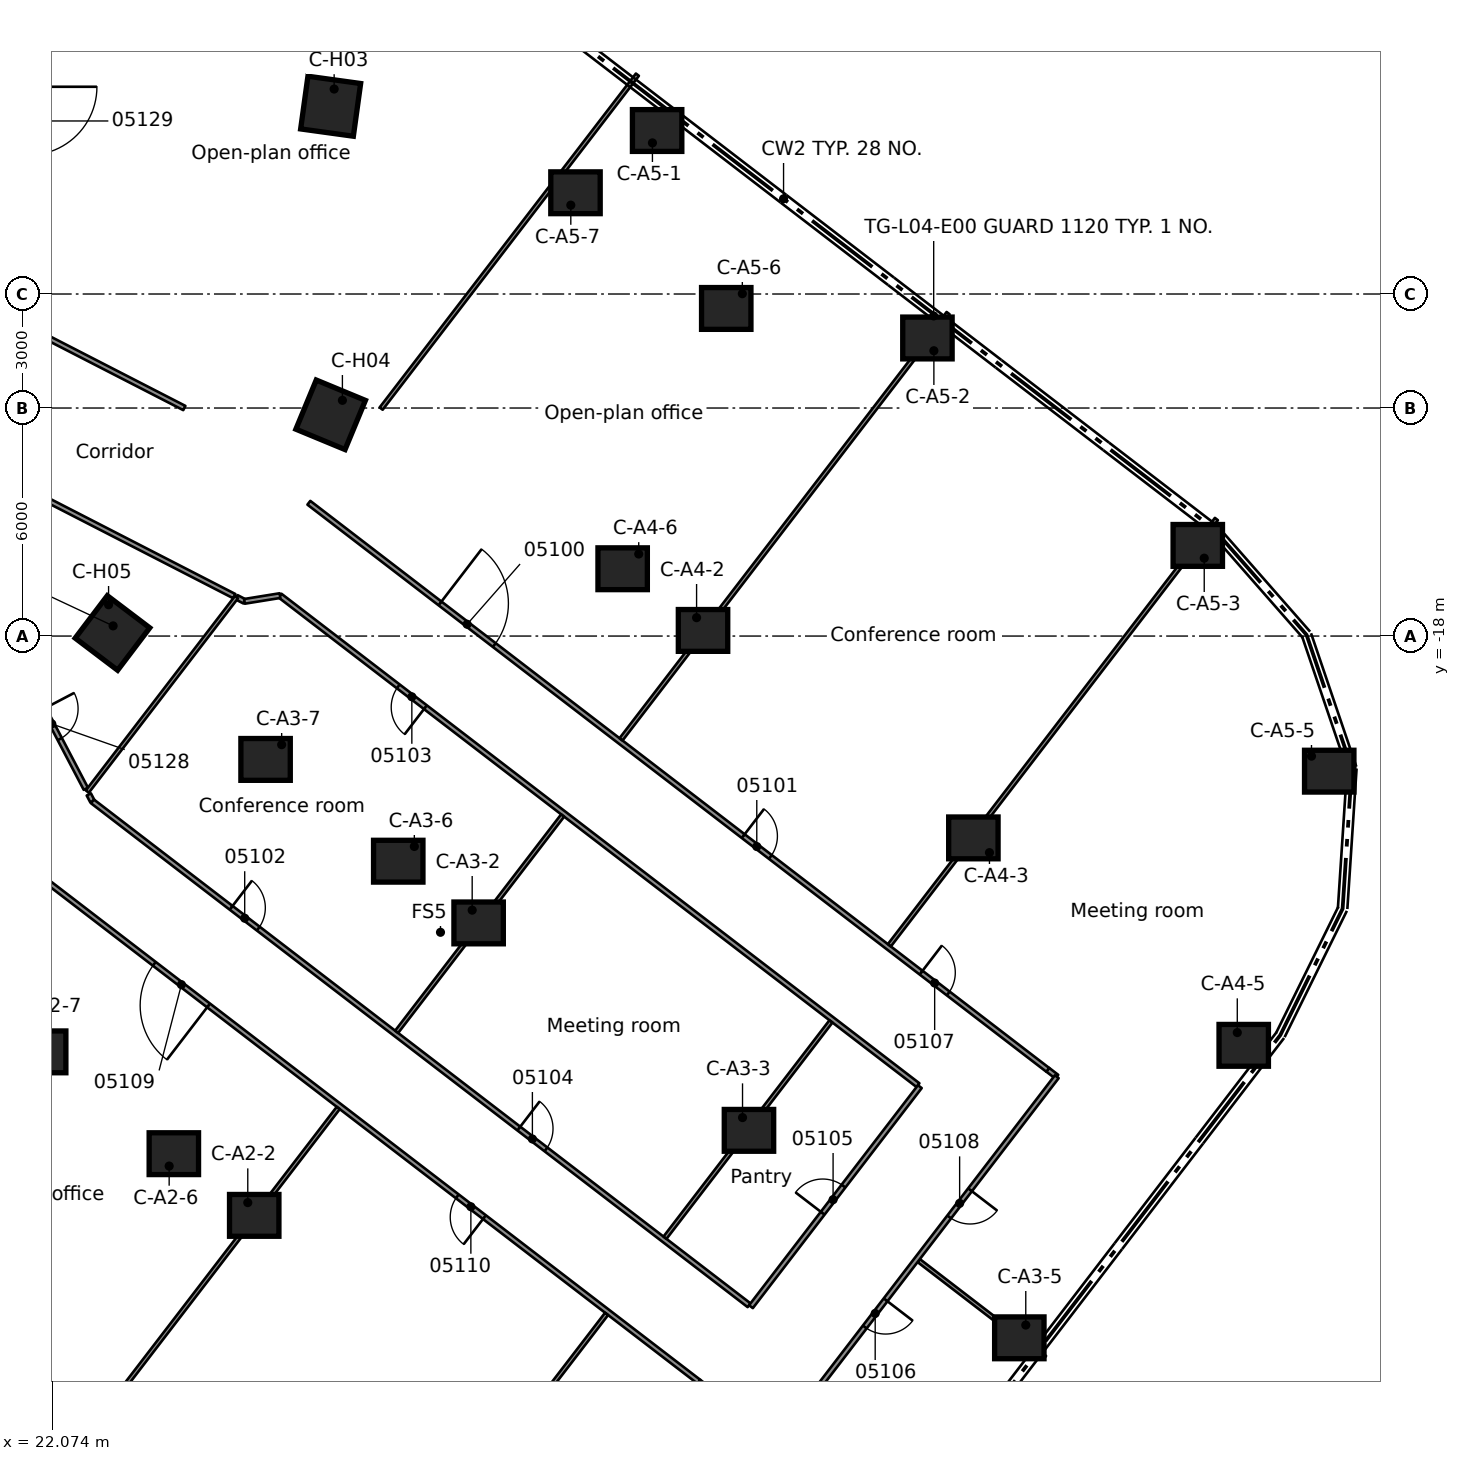
"""IFC4 building model, lengths in metres.
Left out: names, types, materials, properties, quantities, classifications, styles, units other than length and angle.
Written with IfcOpenShell. Run it as: python <this file> out.ifc"""

import sys

from ifc_helpers import new_model, si_unit, direction, frame, frame_2d, origin, origin_2d, place, context, subcontext, project, spatial, rectangle, extrude, element, fill, save


model = new_model("IFC4")
c1 = context("Model", 3, precision=1e-05, world=origin(), true_north=direction((0.0, 1.0)))
c2 = subcontext(c1, "Body", "Model", "MODEL_VIEW")
j1 = project(units=[si_unit("LENGTHUNIT", "METRE"), si_unit("PLANEANGLEUNIT", "RADIAN")], contexts=[c1])
p1 = place(None, origin())
s1 = spatial("IfcSite", under=j1, at=p1, CompositionType="ELEMENT")
p2 = place(p1, origin())
s2 = spatial("IfcBuilding", under=s1, at=p2, CompositionType="ELEMENT")
p3 = place(p2, frame((0.0, 0.0, 25.1)))
s3 = spatial("IfcBuildingStorey", under=s2, at=p3, CompositionType="ELEMENT", Elevation=25.1)
for number, where, z_axis, x_axis in (
    (1, (27.389, -33.243, 0.0), (0.0, 0.0, 1.0), (1.0, 0.0, 0.0)),
    (2, (25.274, -31.62, 0.0), (0.0, 0.0, 1.0), (1.0, 0.0, 0.0)),
    (3, (21.783, -28.941, 0.0), (0.0, 0.0, 1.0), (1.0, 0.0, 0.0)),
    (4, (33.294, -25.548, 0.0), (0.0, 0.0, 1.0), (1.0, 0.0, 0.0)),
    (5, (40.408, -31.006, 0.0), (0.0, 0.0, 1.0), (1.0, 0.0, 0.0)),
    (6, (47.522, -36.465, 0.0), (0.0, 0.0, 1.0), (1.0, 0.0, 0.0)),
    (7, (31.179, -23.924, 0.0), (0.0, 0.0, 1.0), (1.0, 0.0, 0.0)),
    (8, (27.688, -21.246, 0.0), (0.0, 0.0, 1.0), (1.0, 0.0, 0.0)),
    (9, (39.199, -17.852, 0.0), (0.0, 0.0, 1.0), (1.0, 0.0, 0.0)),
    (10, (46.313, -23.311, 0.0), (0.0, 0.0, 1.0), (1.0, 0.0, 0.0)),
    (11, (53.427, -28.769, 0.0), (0.0, 0.0, 1.0), (1.0, 0.0, 0.0)),
    (12, (37.084, -16.229, 0.0), (0.0, 0.0, 1.0), (1.0, 0.0, 0.0)),
    (13, (37.991, -4.698, 0.0), (0.0, 0.0, 1.0), (1.0, 0.0, 0.0)),
    (14, (45.104, -10.157, 0.0), (0.0, 0.0, 1.0), (1.0, 0.0, 0.0)),
    (15, (52.218, -15.615, 0.0), (0.0, 0.0, 1.0), (1.0, 0.0, 0.0)),
    (16, (55.677, -21.555, 0.0), (0.0, 0.0, 1.0), (1.0, 0.0, 0.0)),
    (17, (39.81, -9.38, 0.0), (0.0, 0.0, 1.0), (1.0, 0.0, 0.0)),
    (18, (35.843, -6.336, 0.0), (0.0, 0.0, 1.0), (1.0, 0.0, 0.0)),
):
    element("IfcColumn", number, at=place(p3, frame(where, z_axis=z_axis, x_axis=x_axis)), inside=s3, PredefinedType="COLUMN", context=c2, shape_type="SweptSolid", body=[
        extrude(rectangle(XDim=1.3, YDim=1.1, at=origin_2d()), origin(), (0.0, 0.0, 1.0), 4.1),
    ])
for number, where, z_axis, x_axis in (
    (19, (29.4, -4.059, 0.0), (0.0, 0.0, 1.0), (0.991, -0.137, 0.0)),
    (20, (29.4, -12.178, 0.0), (0.0, 0.0, 1.0), (0.924, -0.383, 0.0)),
    (21, (23.659, -17.919, 0.0), (0.0, 0.0, 1.0), (0.797, -0.604, 0.0)),
):
    element("IfcColumn", number, at=place(p3, frame(where, z_axis=z_axis, x_axis=x_axis)), inside=s3, PredefinedType="COLUMN", context=c2, shape_type="SweptSolid", body=[
        extrude(rectangle(XDim=1.4, YDim=1.4, at=origin_2d()), origin(), (0.0, 0.0, 1.0), 4.1),
    ])
p4 = place(p3, frame((23.036, -22.167, 0.0), z_axis=(0.0, 0.0, 1.0), x_axis=(0.465065214543, -0.885276423623, 0.0)))
e22 = element("IfcWall", 22, at=p4, inside=s3, PredefinedType="PARTITIONING", context=c2, shape_type="SweptSolid", body=[
    extrude(rectangle(XDim=0.207, YDim=0.125, at=frame_2d((0.104, 0.0))), origin(), (0.0, 0.0, 1.0), 3.68),
])
p5 = place(p3, frame((21.14, -18.552, 0.0), z_axis=(0.0, 0.0, 1.0), x_axis=(0.464519693812, -0.885562789451, 0.0)))
e23 = element("IfcWall", 23, at=p5, inside=s3, PredefinedType="PARTITIONING", context=c2, shape_type="SweptSolid", body=[
    extrude(rectangle(XDim=3.914, YDim=0.125, at=frame_2d((1.957, 0.0))), origin(), (0.0, 0.0, 1.0), 3.68),
])
p6 = place(p5, frame((1.538, 0.0, 0.0)))
e24 = element("IfcOpeningElement", 24, at=p6, cuts=e23, PredefinedType="OPENING", context=c2, shape_type="SweptSolid", body=[
    extrude(rectangle(XDim=0.9, YDim=2.1, at=frame_2d((0.45, 1.05))), frame((0.0, 0.073, 0.0), z_axis=(0.0, -1.0, 0.0), x_axis=(1.0, 0.0, 0.0)), (0.0, 0.0, 1.0), 0.145),
])
p7 = place(p3, frame((48.27, -29.412, 0.0), z_axis=(0.0, 0.0, 1.0), x_axis=(0.793016893484, -0.609199644328, 0.0)))
e25 = element("IfcWall", 25, at=p7, inside=s3, PredefinedType="PARTITIONING", context=c2, shape_type="SweptSolid", body=[
    extrude(rectangle(XDim=0.3, YDim=0.125, at=frame_2d((0.15, 0.0))), origin(), (0.0, 0.0, 1.0), 3.68),
])
p8 = place(p3, frame((39.09, -37.62, 0.0), z_axis=(0.0, 0.0, 1.0), x_axis=(-0.793364364442, 0.608747061786, 0.0)))
e26 = element("IfcWall", 26, at=p8, inside=s3, PredefinedType="PARTITIONING", context=c2, shape_type="SweptSolid", body=[
    extrude(rectangle(XDim=22.17, YDim=0.125, at=frame_2d((11.085, 0.0))), origin(), (0.0, 0.0, 1.0), 3.68),
])
p9 = place(p8, frame((16.263, 0.0, 0.0)))
e27 = element("IfcOpeningElement", 27, at=p9, cuts=e26, PredefinedType="OPENING", context=c2, shape_type="SweptSolid", body=[
    extrude(rectangle(XDim=1.8, YDim=2.1, at=frame_2d((0.9, 1.05))), frame((0.0, 0.073, 0.0), z_axis=(0.0, -1.0, 0.0), x_axis=(1.0, 0.0, 0.0)), (0.0, 0.0, 1.0), 0.145),
])
p10 = place(p8, frame((7.113, 0.0, 0.0)))
e28 = element("IfcOpeningElement", 28, at=p10, cuts=e26, PredefinedType="OPENING", context=c2, shape_type="SweptSolid", body=[
    extrude(rectangle(XDim=0.9, YDim=2.1, at=frame_2d((0.45, 1.05))), frame((0.0, 0.073, 0.0), z_axis=(0.0, -1.0, 0.0), x_axis=(1.0, 0.0, 0.0)), (0.0, 0.0, 1.0), 0.145),
])
p11 = place(p3, frame((39.089, -37.62, 0.0), z_axis=(0.0, 0.0, 1.0), x_axis=(0.793216962218, -0.608939119166, 0.0)))
e29 = element("IfcWall", 29, at=p11, inside=s3, PredefinedType="PARTITIONING", context=c2, shape_type="SweptSolid", body=[
    extrude(rectangle(XDim=2.524, YDim=0.125, at=frame_2d((1.262, 0.0))), origin(), (0.0, 0.0, 1.0), 3.68),
])
p12 = place(p3, frame((23.132, -22.35, 0.0), z_axis=(0.0, 0.0, 1.0), x_axis=(0.79336850047, -0.60874167137, 0.0)))
e30 = element("IfcWall", 30, at=p12, inside=s3, PredefinedType="PARTITIONING", context=c2, shape_type="SweptSolid", body=[
    extrude(rectangle(XDim=21.779, YDim=0.125, at=frame_2d((10.89, 0.0))), origin(), (0.0, 0.0, 1.0), 3.68),
])
p13 = place(p12, frame((4.6, 0.0, 0.0)))
e31 = element("IfcOpeningElement", 31, at=p13, cuts=e30, PredefinedType="OPENING", context=c2, shape_type="SweptSolid", body=[
    extrude(rectangle(XDim=0.9, YDim=2.1, at=frame_2d((0.45, 1.05))), frame((0.0, 0.073, 0.0), z_axis=(0.0, -1.0, 0.0), x_axis=(1.0, 0.0, 0.0)), (0.0, 0.0, 1.0), 0.145),
])
p14 = place(p12, frame((14.142, 0.0, 0.0)))
e32 = element("IfcOpeningElement", 32, at=p14, cuts=e30, PredefinedType="OPENING", context=c2, shape_type="SweptSolid", body=[
    extrude(rectangle(XDim=0.9, YDim=2.1, at=frame_2d((0.45, 1.05))), frame((0.0, 0.073, 0.0), z_axis=(0.0, -1.0, 0.0), x_axis=(1.0, 0.0, 0.0)), (0.0, 0.0, 1.0), 0.145),
])
p15 = place(p3, frame((44.875, -34.433, 0.0), z_axis=(0.0, 0.0, 1.0), x_axis=(0.793295570217, -0.60883670904, 0.0)))
e33 = element("IfcWall", 33, at=p15, inside=s3, PredefinedType="PARTITIONING", context=c2, shape_type="SweptSolid", body=[
    extrude(rectangle(XDim=4.186, YDim=0.1, at=frame_2d((2.093, 0.0))), origin(), (0.0, 0.0, 1.0), 3.68),
])
p16 = place(p3, frame((44.855, -29.817, 0.0), z_axis=(0.0, 0.0, 1.0), x_axis=(-0.793378264443, 0.608728945844, 0.0)))
e34 = element("IfcWall", 34, at=p16, inside=s3, PredefinedType="PARTITIONING", context=c2, shape_type="SweptSolid", body=[
    extrude(rectangle(XDim=21.16, YDim=0.125, at=frame_2d((10.58, 0.0))), origin(), (0.0, 0.0, 1.0), 3.68),
])
p17 = place(p16, frame((16.337, 0.0, 0.0)))
e35 = element("IfcOpeningElement", 35, at=p17, cuts=e34, PredefinedType="OPENING", context=c2, shape_type="SweptSolid", body=[
    extrude(rectangle(XDim=0.9, YDim=2.1, at=frame_2d((0.45, 1.05))), frame((0.0, 0.073, 0.0), z_axis=(0.0, -1.0, 0.0), x_axis=(1.0, 0.0, 0.0)), (0.0, 0.0, 1.0), 0.145),
])
p18 = place(p3, frame((28.827, -14.493, 0.0), z_axis=(0.0, 0.0, 1.0), x_axis=(0.793315591759, -0.608810620695, 0.0)))
e36 = element("IfcWall", 36, at=p18, inside=s3, PredefinedType="PARTITIONING", context=c2, shape_type="SweptSolid", body=[
    extrude(rectangle(XDim=24.509, YDim=0.125, at=frame_2d((12.254, 0.0))), origin(), (0.0, 0.0, 1.0), 3.68),
])
p19 = place(p18, frame((4.35, 0.0, 0.0)))
e37 = element("IfcOpeningElement", 37, at=p19, cuts=e36, PredefinedType="OPENING", context=c2, shape_type="SweptSolid", body=[
    extrude(rectangle(XDim=1.8, YDim=2.1, at=frame_2d((0.9, 1.05))), frame((0.0, 0.073, 0.0), z_axis=(0.0, -1.0, 0.0), x_axis=(1.0, 0.0, 0.0)), (0.0, 0.0, 1.0), 0.145),
])
p20 = place(p18, frame((14.407, 0.0, 0.0)))
e38 = element("IfcOpeningElement", 38, at=p20, cuts=e36, PredefinedType="OPENING", context=c2, shape_type="SweptSolid", body=[
    extrude(rectangle(XDim=0.9, YDim=2.1, at=frame_2d((0.45, 1.05))), frame((0.0, 0.073, 0.0), z_axis=(0.0, -1.0, 0.0), x_axis=(1.0, 0.0, 0.0)), (0.0, 0.0, 1.0), 0.145),
])
p21 = place(p18, frame((20.307, 0.0, 0.0)))
e39 = element("IfcOpeningElement", 39, at=p21, cuts=e36, PredefinedType="OPENING", context=c2, shape_type="SweptSolid", body=[
    extrude(rectangle(XDim=0.9, YDim=2.1, at=frame_2d((0.45, 1.05))), frame((0.0, 0.073, 0.0), z_axis=(0.0, -1.0, 0.0), x_axis=(1.0, 0.0, 0.0)), (0.0, 0.0, 1.0), 0.145),
])
p22 = place(p3, frame((26.921, -16.978, 0.0), z_axis=(0.0, 0.0, 1.0), x_axis=(0.888809707019, -0.458276450093, 0.0)))
e40 = element("IfcWall", 40, at=p22, inside=s3, PredefinedType="PARTITIONING", context=c2, shape_type="SweptSolid", body=[
    extrude(rectangle(XDim=0.238, YDim=0.125, at=frame_2d((0.119, 0.0))), origin(), (0.0, 0.0, 1.0), 3.68),
])
p23 = place(p3, frame((21.541, -14.214, 0.0), z_axis=(0.0, 0.0, 1.0), x_axis=(0.889437525622, -0.457056766732, 0.0)))
e41 = element("IfcWall", 41, at=p23, inside=s3, PredefinedType="PARTITIONING", context=c2, shape_type="SweptSolid", body=[
    extrude(rectangle(XDim=5.986, YDim=0.125, at=frame_2d((2.993, 0.0))), origin(), (0.0, 0.0, 1.0), 3.68),
])
p24 = place(p3, frame((21.541, -9.94, 0.0), z_axis=(0.0, 0.0, 1.0), x_axis=(0.889443846495, -0.457044466033, 0.0)))
e42 = element("IfcWall", 42, at=p24, inside=s3, PredefinedType="PARTITIONING", context=c2, shape_type="SweptSolid", body=[
    extrude(rectangle(XDim=4.507, YDim=0.125, at=frame_2d((2.254, 0.0))), origin(), (0.0, 0.0, 1.0), 3.68),
])
p25 = place(p3, frame((48.508, -29.595, 0.0), z_axis=(0.0, 0.0, 1.0), x_axis=(-0.608738166201, -0.793371189929, 0.0)))
e43 = element("IfcWall", 43, at=p25, inside=s3, PredefinedType="PARTITIONING", context=c2, shape_type="SweptSolid", body=[
    extrude(rectangle(XDim=12.1, YDim=0.125, at=frame_2d((6.05, 0.0))), origin(), (0.0, 0.0, 1.0), 3.68),
])
p26 = place(p25, frame((7.4, 0.0, 0.0)))
e44 = element("IfcOpeningElement", 44, at=p26, cuts=e43, PredefinedType="OPENING", context=c2, shape_type="SweptSolid", body=[
    extrude(rectangle(XDim=0.9, YDim=2.1, at=frame_2d((0.45, 1.05))), frame((0.0, 0.073, 0.0), z_axis=(0.0, -1.0, 0.0), x_axis=(1.0, 0.0, 0.0)), (0.0, 0.0, 1.0), 0.145),
])
p27 = place(p25, frame((3.75, 0.0, 0.0)))
e45 = element("IfcOpeningElement", 45, at=p27, cuts=e43, PredefinedType="OPENING", context=c2, shape_type="SweptSolid", body=[
    extrude(rectangle(XDim=0.9, YDim=2.1, at=frame_2d((0.45, 1.05))), frame((0.0, 0.073, 0.0), z_axis=(0.0, -1.0, 0.0), x_axis=(1.0, 0.0, 0.0)), (0.0, 0.0, 1.0), 0.145),
])
p28 = place(p3, frame((40.46, -35.646, 0.0), z_axis=(0.0, 0.0, 1.0), x_axis=(0.608868228501, 0.793271378736, 0.0)))
e46 = element("IfcWall", 46, at=p28, inside=s3, PredefinedType="PARTITIONING", context=c2, shape_type="SweptSolid", body=[
    extrude(rectangle(XDim=7.299, YDim=0.125, at=frame_2d((3.649, 0.0))), origin(), (0.0, 0.0, 1.0), 3.68),
])
p29 = place(p28, frame((3.1, 0.0, 0.0)))
e47 = element("IfcOpeningElement", 47, at=p29, cuts=e46, PredefinedType="OPENING", context=c2, shape_type="SweptSolid", body=[
    extrude(rectangle(XDim=0.9, YDim=2.1, at=frame_2d((0.45, 1.05))), frame((0.0, 0.073, 0.0), z_axis=(0.0, -1.0, 0.0), x_axis=(1.0, 0.0, 0.0)), (0.0, 0.0, 1.0), 0.145),
])
p30 = place(p3, frame((28.054, -47.051, 0.0), z_axis=(0.0, 0.0, 1.0), x_axis=(0.608819037892, 0.793309132117, 0.0)))
e48 = element("IfcWall", 48, at=p30, inside=s3, PredefinedType="PARTITIONING", context=c2, shape_type="SweptSolid", body=[
    extrude(rectangle(XDim=14.137, YDim=0.1, at=frame_2d((7.069, 0.0))), origin(), (0.0, 0.0, 1.0), 3.68),
])
p31 = place(p3, frame((38.198, -33.831, 0.0), z_axis=(0.0, 0.0, 1.0), x_axis=(0.60875801413, 0.793355960608, 0.0)))
e49 = element("IfcWall", 49, at=p31, inside=s3, PredefinedType="PARTITIONING", context=c2, shape_type="SweptSolid", body=[
    extrude(rectangle(XDim=7.174, YDim=0.1, at=frame_2d((3.587, 0.0))), origin(), (0.0, 0.0, 1.0), 3.68),
])
p32 = place(p3, frame((44.103, -26.136, 0.0), z_axis=(0.0, 0.0, 1.0), x_axis=(0.608732079898, 0.793375859793, 0.0)))
e50 = element("IfcWall", 50, at=p32, inside=s3, PredefinedType="PARTITIONING", context=c2, shape_type="SweptSolid", body=[
    extrude(rectangle(XDim=14.136, YDim=0.1, at=frame_2d((7.068, 0.0))), origin(), (0.0, 0.0, 1.0), 3.68),
])
p33 = place(p3, frame((20.993, -41.633, 0.0), z_axis=(0.0, 0.0, 1.0), x_axis=(0.608829906099, 0.793300791277, 0.0)))
e51 = element("IfcWall", 51, at=p33, inside=s3, PredefinedType="PARTITIONING", context=c2, shape_type="SweptSolid", body=[
    extrude(rectangle(XDim=14.137, YDim=0.1, at=frame_2d((7.069, 0.0))), origin(), (0.0, 0.0, 1.0), 3.68),
])
p34 = place(p3, frame((31.137, -28.413, 0.0), z_axis=(0.0, 0.0, 1.0), x_axis=(0.608843688194, 0.793290213822, 0.0)))
e52 = element("IfcWall", 52, at=p34, inside=s3, PredefinedType="PARTITIONING", context=c2, shape_type="SweptSolid", body=[
    extrude(rectangle(XDim=7.174, YDim=0.1, at=frame_2d((3.587, 0.0))), origin(), (0.0, 0.0, 1.0), 3.68),
])
p35 = place(p3, frame((37.042, -20.718, 0.0), z_axis=(0.0, 0.0, 1.0), x_axis=(0.608775561638, 0.793342495743, 0.0)))
e53 = element("IfcWall", 53, at=p35, inside=s3, PredefinedType="PARTITIONING", context=c2, shape_type="SweptSolid", body=[
    extrude(rectangle(XDim=14.136, YDim=0.1, at=frame_2d((7.068, 0.0))), origin(), (0.0, 0.0, 1.0), 3.68),
])
p36 = place(p3, frame((22.997, -22.092, 0.0), z_axis=(0.0, 0.0, 1.0), x_axis=(0.608732859409, 0.793375261699, 0.0)))
e54 = element("IfcWall", 54, at=p36, inside=s3, PredefinedType="PARTITIONING", context=c2, shape_type="SweptSolid", body=[
    extrude(rectangle(XDim=6.446, YDim=0.1, at=frame_2d((3.223, 0.0))), origin(), (0.0, 0.0, 1.0), 3.68),
])
p37 = place(p3, frame((30.729, -12.015, 0.0), z_axis=(0.0, 0.0, 1.0), x_axis=(0.608833626101, 0.793297936294, 0.0)))
e55 = element("IfcWall", 55, at=p37, inside=s3, PredefinedType="PARTITIONING", context=c2, shape_type="SweptSolid", body=[
    extrude(rectangle(XDim=11.075, YDim=0.1, at=frame_2d((5.538, 0.0))), origin(), (0.0, 0.0, 1.0), 3.68),
])
p38 = place(p3, frame((27.132, -17.087, 0.0), z_axis=(0.0, 0.0, 1.0), x_axis=(0.987224118301, 0.159337817997, 0.0)))
e56 = element("IfcWall", 56, at=p38, inside=s3, PredefinedType="PARTITIONING", context=c2, shape_type="SweptSolid", body=[
    extrude(rectangle(XDim=0.947, YDim=0.125, at=frame_2d((0.474, 0.0))), origin(), (0.0, 0.0, 1.0), 3.68),
])
p39 = place(p19, origin())
e57 = element("IfcDoor", 57, at=p39, inside=s3, OperationType="DOUBLE_DOOR_SINGLE_SWING", PredefinedType="DOOR", context=c2, shape_type="SweptSolid", body=[
    extrude(rectangle(XDim=1.8, YDim=2.1, at=frame_2d((0.9, 1.05))), frame((0.0, 0.025, 0.0), z_axis=(0.0, -1.0, 0.0), x_axis=(1.0, 0.0, 0.0)), (0.0, 0.0, 1.0), 0.05),
])
fill(e37, e57)
p40 = place(p20, origin())
e58 = element("IfcDoor", 58, at=p40, inside=s3, OperationType="SINGLE_SWING_RIGHT", PredefinedType="DOOR", context=c2, shape_type="SweptSolid", body=[
    extrude(rectangle(XDim=0.9, YDim=2.1, at=frame_2d((0.45, 1.05))), frame((0.0, 0.025, 0.0), z_axis=(0.0, -1.0, 0.0), x_axis=(1.0, 0.0, 0.0)), (0.0, 0.0, 1.0), 0.05),
])
fill(e38, e58)
p41 = place(p13, origin())
e59 = element("IfcDoor", 59, at=p41, inside=s3, OperationType="SINGLE_SWING_LEFT", PredefinedType="DOOR", context=c2, shape_type="SweptSolid", body=[
    extrude(rectangle(XDim=0.9, YDim=2.1, at=frame_2d((0.45, 1.05))), frame((0.0, 0.025, 0.0), z_axis=(0.0, -1.0, 0.0), x_axis=(1.0, 0.0, 0.0)), (0.0, 0.0, 1.0), 0.05),
])
fill(e31, e59)
p42 = place(p17, origin())
e60 = element("IfcDoor", 60, at=p42, inside=s3, OperationType="SINGLE_SWING_RIGHT", PredefinedType="DOOR", context=c2, shape_type="SweptSolid", body=[
    extrude(rectangle(XDim=0.9, YDim=2.1, at=frame_2d((0.45, 1.05))), frame((0.0, 0.025, 0.0), z_axis=(0.0, -1.0, 0.0), x_axis=(1.0, 0.0, 0.0)), (0.0, 0.0, 1.0), 0.05),
])
fill(e35, e60)
p43 = place(p14, origin())
e61 = element("IfcDoor", 61, at=p43, inside=s3, OperationType="SINGLE_SWING_RIGHT", PredefinedType="DOOR", context=c2, shape_type="SweptSolid", body=[
    extrude(rectangle(XDim=0.9, YDim=2.1, at=frame_2d((0.45, 1.05))), frame((0.0, 0.025, 0.0), z_axis=(0.0, -1.0, 0.0), x_axis=(1.0, 0.0, 0.0)), (0.0, 0.0, 1.0), 0.05),
])
fill(e32, e61)
p44 = place(p29, origin())
e62 = element("IfcDoor", 62, at=p44, inside=s3, OperationType="SINGLE_SWING_LEFT", PredefinedType="DOOR", context=c2, shape_type="SweptSolid", body=[
    extrude(rectangle(XDim=0.9, YDim=2.1, at=frame_2d((0.45, 1.05))), frame((0.0, 0.025, 0.0), z_axis=(0.0, -1.0, 0.0), x_axis=(1.0, 0.0, 0.0)), (0.0, 0.0, 1.0), 0.05),
])
fill(e47, e62)
p45 = place(p26, origin())
e63 = element("IfcDoor", 63, at=p45, inside=s3, OperationType="SINGLE_SWING_RIGHT", PredefinedType="DOOR", context=c2, shape_type="SweptSolid", body=[
    extrude(rectangle(XDim=0.9, YDim=2.1, at=frame_2d((0.45, 1.05))), frame((0.0, 0.025, 0.0), z_axis=(0.0, -1.0, 0.0), x_axis=(1.0, 0.0, 0.0)), (0.0, 0.0, 1.0), 0.05),
])
fill(e44, e63)
p46 = place(p21, origin())
e64 = element("IfcDoor", 64, at=p46, inside=s3, OperationType="SINGLE_SWING_RIGHT", PredefinedType="DOOR", context=c2, shape_type="SweptSolid", body=[
    extrude(rectangle(XDim=0.9, YDim=2.1, at=frame_2d((0.45, 1.05))), frame((0.0, 0.025, 0.0), z_axis=(0.0, -1.0, 0.0), x_axis=(1.0, 0.0, 0.0)), (0.0, 0.0, 1.0), 0.05),
])
fill(e39, e64)
p47 = place(p27, origin())
e65 = element("IfcDoor", 65, at=p47, inside=s3, OperationType="SINGLE_SWING_LEFT", PredefinedType="DOOR", context=c2, shape_type="SweptSolid", body=[
    extrude(rectangle(XDim=0.9, YDim=2.1, at=frame_2d((0.45, 1.05))), frame((0.0, 0.025, 0.0), z_axis=(0.0, -1.0, 0.0), x_axis=(1.0, 0.0, 0.0)), (0.0, 0.0, 1.0), 0.05),
])
fill(e45, e65)
p48 = place(p9, origin())
e66 = element("IfcDoor", 66, at=p48, inside=s3, OperationType="DOUBLE_DOOR_SINGLE_SWING", PredefinedType="DOOR", context=c2, shape_type="SweptSolid", body=[
    extrude(rectangle(XDim=1.8, YDim=2.1, at=frame_2d((0.9, 1.05))), frame((0.0, 0.025, 0.0), z_axis=(0.0, -1.0, 0.0), x_axis=(1.0, 0.0, 0.0)), (0.0, 0.0, 1.0), 0.05),
])
fill(e27, e66)
p49 = place(p10, origin())
e67 = element("IfcDoor", 67, at=p49, inside=s3, OperationType="SINGLE_SWING_LEFT", PredefinedType="DOOR", context=c2, shape_type="SweptSolid", body=[
    extrude(rectangle(XDim=0.9, YDim=2.1, at=frame_2d((0.45, 1.05))), frame((0.0, 0.025, 0.0), z_axis=(0.0, -1.0, 0.0), x_axis=(1.0, 0.0, 0.0)), (0.0, 0.0, 1.0), 0.05),
])
fill(e28, e67)
p50 = place(p6, origin())
e68 = element("IfcDoor", 68, at=p50, inside=s3, OperationType="SINGLE_SWING_RIGHT", PredefinedType="DOOR", context=c2, shape_type="SweptSolid", body=[
    extrude(rectangle(XDim=0.9, YDim=2.1, at=frame_2d((0.45, 1.05))), frame((0.0, 0.025, 0.0), z_axis=(0.0, -1.0, 0.0), x_axis=(1.0, 0.0, 0.0)), (0.0, 0.0, 1.0), 0.05),
])
fill(e24, e68)
save(model, sys.argv[1])
